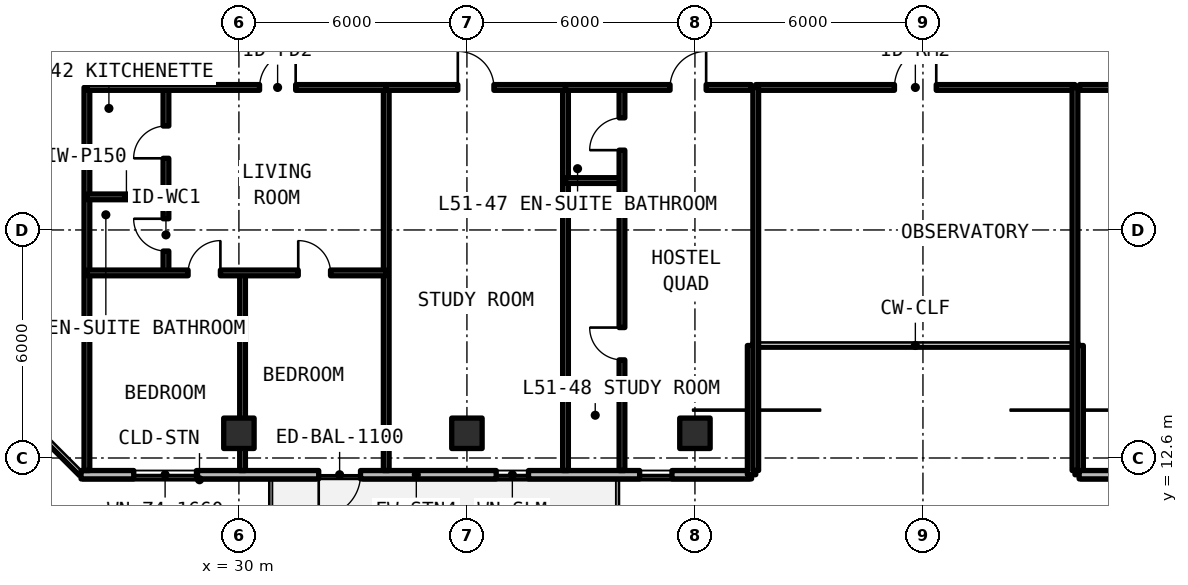
"""IFC4 building model, lengths in metres.
Left out: names, types, materials, properties, quantities, classifications, styles, units other than length and angle.
Written with IfcOpenShell. Run it as: python <this file> out.ifc"""

import sys

from ifc_helpers import new_model, si_unit, direction, frame, frame_2d, origin, origin_2d, place, context, subcontext, project, spatial, rectangle, extrude, element, fill, save


model = new_model("IFC4")
c1 = context("Model", 3, precision=1e-05, world=origin(), true_north=direction((0.0, 1.0)))
c2 = subcontext(c1, "Body", "Model", "MODEL_VIEW")
j1 = project(units=[si_unit("LENGTHUNIT", "METRE"), si_unit("PLANEANGLEUNIT", "RADIAN")], contexts=[c1])
p1 = place(None, origin())
s1 = spatial("IfcSite", under=j1, at=p1, CompositionType="ELEMENT")
p2 = place(p1, origin())
s2 = spatial("IfcBuilding", under=s1, at=p2, CompositionType="ELEMENT")
p3 = place(p2, frame((0.0, 0.0, 185.13)))
s3 = spatial("IfcBuildingStorey", under=s2, at=p3, CompositionType="ELEMENT", Elevation=185.13)
for number, where, z_axis, x_axis in (
    (1, (30.0, 13.25, 0.0), (0.0, 0.0, 1.0), (1.0, 0.0, 0.0)),
    (2, (36.0, 13.25, 0.0), (0.0, 0.0, 1.0), (1.0, 0.0, 0.0)),
    (3, (42.0, 13.25, 0.0), (0.0, 0.0, 1.0), (1.0, 0.0, 0.0)),
):
    element("IfcColumn", number, at=place(p3, frame(where, z_axis=z_axis, x_axis=x_axis)), inside=s3, PredefinedType="COLUMN", context=c2, shape_type="SweptSolid", body=[
        extrude(rectangle(XDim=0.8, YDim=0.8, at=origin_2d()), origin(), (0.0, 0.0, 1.0), 3.3),
    ])
p4 = place(p3, frame((25.846, 12.16, 0.0), z_axis=(0.0, 0.0, 1.0), x_axis=(1.0, 0.0, 0.0)))
e4 = element("IfcWall", 4, at=p4, inside=s3, PredefinedType="SOLIDWALL", context=c2, shape_type="SweptSolid", body=[
    extrude(rectangle(XDim=17.644, YDim=0.22, at=frame_2d((8.822, 0.0))), origin(), (0.0, 0.0, 1.0), 3.08),
])
p5 = place(p4, frame((6.254, 0.0, 0.0)))
e5 = element("IfcOpeningElement", 5, at=p5, cuts=e4, PredefinedType="OPENING", context=c2, shape_type="SweptSolid", body=[
    extrude(rectangle(XDim=1.1, YDim=2.15, at=frame_2d((0.55, 1.075))), frame((0.0, 0.12, 0.0), z_axis=(0.0, -1.0, 0.0), x_axis=(1.0, 0.0, 0.0)), (0.0, 0.0, 1.0), 0.24),
])
p6 = place(p4, frame((1.387, 0.0, 0.78)))
e6 = element("IfcOpeningElement", 6, at=p6, cuts=e4, PredefinedType="OPENING", context=c2, shape_type="SweptSolid", body=[
    extrude(rectangle(XDim=1.65, YDim=1.66, at=frame_2d((0.825, 0.83))), frame((0.0, 0.12, 0.0), z_axis=(0.0, -1.0, 0.0), x_axis=(1.0, 0.0, 0.0)), (0.0, 0.0, 1.0), 0.24),
])
p7 = place(p4, frame((10.925, 0.0, 0.78)))
e7 = element("IfcOpeningElement", 7, at=p7, cuts=e4, PredefinedType="OPENING", context=c2, shape_type="SweptSolid", body=[
    extrude(rectangle(XDim=0.85, YDim=1.65, at=frame_2d((0.425, 0.825))), frame((0.0, 0.12, 0.0), z_axis=(0.0, -1.0, 0.0), x_axis=(1.0, 0.0, 0.0)), (0.0, 0.0, 1.0), 0.24),
])
p8 = place(p4, frame((14.699, 0.0, 0.78)))
e8 = element("IfcOpeningElement", 8, at=p8, cuts=e4, PredefinedType="OPENING", context=c2, shape_type="SweptSolid", body=[
    extrude(rectangle(XDim=0.85, YDim=1.65, at=frame_2d((0.425, 0.825))), frame((0.0, 0.12, 0.0), z_axis=(0.0, -1.0, 0.0), x_axis=(1.0, 0.0, 0.0)), (0.0, 0.0, 1.0), 0.24),
])
for number, where, z_axis, x_axis in (
    (9, (43.49, 12.16, 0.0), (0.0, 0.0, 1.0), (0.0, 1.0, 0.0)),
    (10, (52.11, 15.56, 0.0), (0.0, 0.0, 1.0), (0.0, -1.0, 0.0)),
):
    element("IfcWall", number, at=place(p3, frame(where, z_axis=z_axis, x_axis=x_axis)), inside=s3, PredefinedType="SOLIDWALL", context=c2, shape_type="SweptSolid", body=[
        extrude(rectangle(XDim=3.4, YDim=0.22, at=frame_2d((1.7, 0.0))), origin(), (0.0, 0.0, 1.0), 3.08),
    ])
p9 = place(p3, frame((52.11, 12.16, 0.0), z_axis=(0.0, 0.0, 1.0), x_axis=(1.0, 0.0, 0.0)))
e11 = element("IfcWall", 11, at=p9, inside=s3, PredefinedType="SOLIDWALL", context=c2, shape_type="SweptSolid", body=[
    extrude(rectangle(XDim=43.244, YDim=0.22, at=frame_2d((21.622, 0.0))), origin(), (0.0, 0.0, 1.0), 3.08),
])
p10 = place(p9, frame((4.19, 0.0, 0.0)))
e12 = element("IfcOpeningElement", 12, at=p10, cuts=e11, PredefinedType="OPENING", context=c2, shape_type="SweptSolid", body=[
    extrude(rectangle(XDim=1.1, YDim=2.15, at=frame_2d((0.55, 1.075))), frame((0.0, 0.12, 0.0), z_axis=(0.0, -1.0, 0.0), x_axis=(1.0, 0.0, 0.0)), (0.0, 0.0, 1.0), 0.24),
])
p11 = place(p9, frame((17.54, 0.0, 0.0)))
e13 = element("IfcOpeningElement", 13, at=p11, cuts=e11, PredefinedType="OPENING", context=c2, shape_type="SweptSolid", body=[
    extrude(rectangle(XDim=1.1, YDim=2.15, at=frame_2d((0.55, 1.075))), frame((0.0, 0.12, 0.0), z_axis=(0.0, -1.0, 0.0), x_axis=(1.0, 0.0, 0.0)), (0.0, 0.0, 1.0), 0.24),
])
p12 = place(p9, frame((28.89, 0.0, 0.0)))
e14 = element("IfcOpeningElement", 14, at=p12, cuts=e11, PredefinedType="OPENING", context=c2, shape_type="SweptSolid", body=[
    extrude(rectangle(XDim=1.1, YDim=2.15, at=frame_2d((0.55, 1.075))), frame((0.0, 0.12, 0.0), z_axis=(0.0, -1.0, 0.0), x_axis=(1.0, 0.0, 0.0)), (0.0, 0.0, 1.0), 0.24),
])
p13 = place(p9, frame((8.66, 0.0, 0.78)))
e15 = element("IfcOpeningElement", 15, at=p13, cuts=e11, PredefinedType="OPENING", context=c2, shape_type="SweptSolid", body=[
    extrude(rectangle(XDim=1.65, YDim=1.66, at=frame_2d((0.825, 0.83))), frame((0.0, 0.12, 0.0), z_axis=(0.0, -1.0, 0.0), x_axis=(1.0, 0.0, 0.0)), (0.0, 0.0, 1.0), 0.24),
])
p14 = place(p9, frame((14.759, 0.0, 0.78)))
e16 = element("IfcOpeningElement", 16, at=p14, cuts=e11, PredefinedType="OPENING", context=c2, shape_type="SweptSolid", body=[
    extrude(rectangle(XDim=1.65, YDim=1.66, at=frame_2d((0.825, 0.83))), frame((0.0, 0.12, 0.0), z_axis=(0.0, -1.0, 0.0), x_axis=(1.0, 0.0, 0.0)), (0.0, 0.0, 1.0), 0.24),
])
p15 = place(p9, frame((32.902, 0.0, 0.78)))
e17 = element("IfcOpeningElement", 17, at=p15, cuts=e11, PredefinedType="OPENING", context=c2, shape_type="SweptSolid", body=[
    extrude(rectangle(XDim=1.65, YDim=1.66, at=frame_2d((0.825, 0.83))), frame((0.0, 0.12, 0.0), z_axis=(0.0, -1.0, 0.0), x_axis=(1.0, 0.0, 0.0)), (0.0, 0.0, 1.0), 0.24),
])
p16 = place(p9, frame((38.313, 0.0, 0.78)))
e18 = element("IfcOpeningElement", 18, at=p16, cuts=e11, PredefinedType="OPENING", context=c2, shape_type="SweptSolid", body=[
    extrude(rectangle(XDim=0.85, YDim=1.65, at=frame_2d((0.425, 0.825))), frame((0.0, 0.12, 0.0), z_axis=(0.0, -1.0, 0.0), x_axis=(1.0, 0.0, 0.0)), (0.0, 0.0, 1.0), 0.24),
])
p17 = place(p9, frame((40.615, 0.0, 0.78)))
e19 = element("IfcOpeningElement", 19, at=p17, cuts=e11, PredefinedType="OPENING", context=c2, shape_type="SweptSolid", body=[
    extrude(rectangle(XDim=1.65, YDim=1.66, at=frame_2d((0.825, 0.83))), frame((0.0, 0.12, 0.0), z_axis=(0.0, -1.0, 0.0), x_axis=(1.0, 0.0, 0.0)), (0.0, 0.0, 1.0), 0.24),
])
p18 = place(p3, frame((43.6, 22.35, 0.0), z_axis=(0.0, 0.0, 1.0), x_axis=(1.0, 0.0, 0.0)))
e20 = element("IfcWall", 20, at=p18, inside=s3, PredefinedType="SOLIDWALL", context=c2, shape_type="SweptSolid", body=[
    extrude(rectangle(XDim=8.4, YDim=0.15, at=frame_2d((4.2, 0.0))), origin(), (0.0, 0.0, 1.0), 2.35),
])
p19 = place(p18, frame((3.65, 0.0, 0.0)))
e21 = element("IfcOpeningElement", 21, at=p19, cuts=e20, PredefinedType="OPENING", context=c2, shape_type="SweptSolid", body=[
    extrude(rectangle(XDim=1.1, YDim=2.15, at=frame_2d((0.55, 1.075))), frame((0.0, 0.085, 0.0), z_axis=(0.0, -1.0, 0.0), x_axis=(1.0, 0.0, 0.0)), (0.0, 0.0, 1.0), 0.17),
])
for number, where, z_axis, x_axis in (
    (22, (43.6, 12.27, 0.0), (0.0, 0.0, 1.0), (0.0, 1.0, 0.0)),
    (23, (52.0, 12.27, 0.0), (0.0, 0.0, 1.0), (0.0, 1.0, 0.0)),
    (24, (26.0, 12.27, 0.0), (0.0, 0.0, 1.0), (0.0, 1.0, 0.0)),
    (25, (33.876, 12.27, 0.0), (0.0, 0.0, 1.0), (0.0, 1.0, 0.0)),
):
    element("IfcWall", number, at=place(p3, frame(where, z_axis=z_axis, x_axis=x_axis)), inside=s3, PredefinedType="SOLIDWALL", context=c2, shape_type="SweptSolid", body=[
        extrude(rectangle(XDim=10.08, YDim=0.15, at=frame_2d((5.04, 0.0))), origin(), (0.0, 0.0, 1.0), 2.35),
    ])
p20 = place(p3, frame((26.0, 19.471, 0.0), z_axis=(0.0, 0.0, 1.0), x_axis=(1.0, 0.0, 0.0)))
e26 = element("IfcWall", 26, at=p20, inside=s3, PredefinedType="PARTITIONING", context=c2, shape_type="SweptSolid", body=[
    extrude(rectangle(XDim=2.08, YDim=0.15, at=frame_2d((1.04, 0.0))), origin(), (0.0, 0.0, 1.0), 2.35),
])
p21 = place(p3, frame((28.08, 17.47, 0.0), z_axis=(0.0, 0.0, 1.0), x_axis=(0.0, 1.0, 0.0)))
e27 = element("IfcWall", 27, at=p21, inside=s3, PredefinedType="PARTITIONING", context=c2, shape_type="SweptSolid", body=[
    extrude(rectangle(XDim=4.88, YDim=0.15, at=frame_2d((2.44, 0.0))), origin(), (0.0, 0.0, 1.0), 2.35),
])
p22 = place(p21, frame((0.575, 0.0, 0.0)))
e28 = element("IfcOpeningElement", 28, at=p22, cuts=e27, PredefinedType="OPENING", context=c2, shape_type="SweptSolid", body=[
    extrude(rectangle(XDim=0.85, YDim=2.1, at=frame_2d((0.425, 1.05))), frame((0.0, 0.085, 0.0), z_axis=(0.0, -1.0, 0.0), x_axis=(1.0, 0.0, 0.0)), (0.0, 0.0, 1.0), 0.17),
])
p23 = place(p21, frame((3.015, 0.0, 0.0)))
e29 = element("IfcOpeningElement", 29, at=p23, cuts=e27, PredefinedType="OPENING", context=c2, shape_type="SweptSolid", body=[
    extrude(rectangle(XDim=0.85, YDim=2.1, at=frame_2d((0.425, 1.05))), frame((0.0, 0.085, 0.0), z_axis=(0.0, -1.0, 0.0), x_axis=(1.0, 0.0, 0.0)), (0.0, 0.0, 1.0), 0.17),
])
p24 = place(p3, frame((30.096, 12.27, 0.0), z_axis=(0.0, 0.0, 1.0), x_axis=(0.0, 1.0, 0.0)))
e30 = element("IfcWall", 30, at=p24, inside=s3, PredefinedType="PARTITIONING", context=c2, shape_type="SweptSolid", body=[
    extrude(rectangle(XDim=5.2, YDim=0.15, at=frame_2d((2.6, 0.0))), origin(), (0.0, 0.0, 1.0), 2.35),
])
p25 = place(p3, frame((26.0, 17.47, 0.0), z_axis=(0.0, 0.0, 1.0), x_axis=(1.0, 0.0, 0.0)))
e31 = element("IfcWall", 31, at=p25, inside=s3, PredefinedType="PARTITIONING", context=c2, shape_type="SweptSolid", body=[
    extrude(rectangle(XDim=7.876, YDim=0.15, at=frame_2d((3.938, 0.0))), origin(), (0.0, 0.0, 1.0), 2.35),
])
p26 = place(p25, frame((2.663, 0.0, 0.0)))
e32 = element("IfcOpeningElement", 32, at=p26, cuts=e31, PredefinedType="OPENING", context=c2, shape_type="SweptSolid", body=[
    extrude(rectangle(XDim=0.85, YDim=2.1, at=frame_2d((0.425, 1.05))), frame((0.0, 0.085, 0.0), z_axis=(0.0, -1.0, 0.0), x_axis=(1.0, 0.0, 0.0)), (0.0, 0.0, 1.0), 0.17),
])
p27 = place(p25, frame((5.561, 0.0, 0.0)))
e33 = element("IfcOpeningElement", 33, at=p27, cuts=e31, PredefinedType="OPENING", context=c2, shape_type="SweptSolid", body=[
    extrude(rectangle(XDim=0.85, YDim=2.1, at=frame_2d((0.425, 1.05))), frame((0.0, 0.085, 0.0), z_axis=(0.0, -1.0, 0.0), x_axis=(1.0, 0.0, 0.0)), (0.0, 0.0, 1.0), 0.17),
])
p28 = place(p3, frame((26.0, 22.35, 0.0), z_axis=(0.0, 0.0, 1.0), x_axis=(1.0, 0.0, 0.0)))
e34 = element("IfcWall", 34, at=p28, inside=s3, PredefinedType="SOLIDWALL", context=c2, shape_type="SweptSolid", body=[
    extrude(rectangle(XDim=7.876, YDim=0.15, at=frame_2d((3.938, 0.0))), origin(), (0.0, 0.0, 1.0), 2.35),
])
p29 = place(p28, frame((4.543, 0.0, 0.0)))
e35 = element("IfcOpeningElement", 35, at=p29, cuts=e34, PredefinedType="OPENING", context=c2, shape_type="SweptSolid", body=[
    extrude(rectangle(XDim=0.95, YDim=2.15, at=frame_2d((0.475, 1.075))), frame((0.0, 0.085, 0.0), z_axis=(0.0, -1.0, 0.0), x_axis=(1.0, 0.0, 0.0)), (0.0, 0.0, 1.0), 0.17),
])
p30 = place(p3, frame((38.594, 12.27, 0.0), z_axis=(0.0, 0.0, 1.0), x_axis=(0.0, 1.0, 0.0)))
e36 = element("IfcWall", 36, at=p30, inside=s3, PredefinedType="SOLIDWALL", context=c2, shape_type="SweptSolid", body=[
    extrude(rectangle(XDim=10.08, YDim=0.15, at=frame_2d((5.04, 0.0))), origin(), (0.0, 0.0, 1.0), 2.35),
])
p31 = place(p3, frame((33.876, 22.35, 0.0), z_axis=(0.0, 0.0, 1.0), x_axis=(1.0, 0.0, 0.0)))
e37 = element("IfcWall", 37, at=p31, inside=s3, PredefinedType="SOLIDWALL", context=c2, shape_type="SweptSolid", body=[
    extrude(rectangle(XDim=4.718, YDim=0.15, at=frame_2d((2.359, 0.0))), origin(), (0.0, 0.0, 1.0), 2.35),
])
p32 = place(p31, frame((1.884, 0.0, 0.0)))
e38 = element("IfcOpeningElement", 38, at=p32, cuts=e37, PredefinedType="OPENING", context=c2, shape_type="SweptSolid", body=[
    extrude(rectangle(XDim=0.95, YDim=2.15, at=frame_2d((0.475, 1.075))), frame((0.0, 0.085, 0.0), z_axis=(0.0, -1.0, 0.0), x_axis=(1.0, 0.0, 0.0)), (0.0, 0.0, 1.0), 0.17),
])
p33 = place(p3, frame((38.594, 19.9, 0.0), z_axis=(0.0, 0.0, 1.0), x_axis=(1.0, 0.0, 0.0)))
e39 = element("IfcWall", 39, at=p33, inside=s3, PredefinedType="PARTITIONING", context=c2, shape_type="SweptSolid", body=[
    extrude(rectangle(XDim=1.486, YDim=0.15, at=frame_2d((0.743, 0.0))), origin(), (0.0, 0.0, 1.0), 2.35),
])
p34 = place(p3, frame((40.08, 12.27, 0.0), z_axis=(0.0, 0.0, 1.0), x_axis=(0.0, 1.0, 0.0)))
e40 = element("IfcWall", 40, at=p34, inside=s3, PredefinedType="PARTITIONING", context=c2, shape_type="SweptSolid", body=[
    extrude(rectangle(XDim=10.08, YDim=0.15, at=frame_2d((5.04, 0.0))), origin(), (0.0, 0.0, 1.0), 2.35),
])
p35 = place(p34, frame((2.912, 0.0, 0.0)))
e41 = element("IfcOpeningElement", 41, at=p35, cuts=e40, PredefinedType="OPENING", context=c2, shape_type="SweptSolid", body=[
    extrude(rectangle(XDim=0.85, YDim=2.1, at=frame_2d((0.425, 1.05))), frame((0.0, 0.085, 0.0), z_axis=(0.0, -1.0, 0.0), x_axis=(1.0, 0.0, 0.0)), (0.0, 0.0, 1.0), 0.17),
])
p36 = place(p34, frame((8.43, 0.0, 0.0)))
e42 = element("IfcOpeningElement", 42, at=p36, cuts=e40, PredefinedType="OPENING", context=c2, shape_type="SweptSolid", body=[
    extrude(rectangle(XDim=0.85, YDim=2.1, at=frame_2d((0.425, 1.05))), frame((0.0, 0.085, 0.0), z_axis=(0.0, -1.0, 0.0), x_axis=(1.0, 0.0, 0.0)), (0.0, 0.0, 1.0), 0.17),
])
p37 = place(p3, frame((38.594, 22.35, 0.0), z_axis=(0.0, 0.0, 1.0), x_axis=(1.0, 0.0, 0.0)))
e43 = element("IfcWall", 43, at=p37, inside=s3, PredefinedType="SOLIDWALL", context=c2, shape_type="SweptSolid", body=[
    extrude(rectangle(XDim=4.886, YDim=0.15, at=frame_2d((2.443, 0.0))), origin(), (0.0, 0.0, 1.0), 2.35),
])
p38 = place(p37, frame((2.751, 0.0, 0.0)))
e44 = element("IfcOpeningElement", 44, at=p38, cuts=e43, PredefinedType="OPENING", context=c2, shape_type="SweptSolid", body=[
    extrude(rectangle(XDim=0.95, YDim=2.15, at=frame_2d((0.475, 1.075))), frame((0.0, 0.085, 0.0), z_axis=(0.0, -1.0, 0.0), x_axis=(1.0, 0.0, 0.0)), (0.0, 0.0, 1.0), 0.17),
])
p39 = place(p3, frame((52.12, 22.35, 0.0), z_axis=(0.0, 0.0, 1.0), x_axis=(1.0, 0.0, 0.0)))
e45 = element("IfcWall", 45, at=p39, inside=s3, PredefinedType="SOLIDWALL", context=c2, shape_type="SweptSolid", body=[
    extrude(rectangle(XDim=5.976, YDim=0.15, at=frame_2d((2.988, 0.0))), origin(), (0.0, 0.0, 1.0), 2.35),
])
p40 = place(p39, frame((2.513, 0.0, 0.0)))
e46 = element("IfcOpeningElement", 46, at=p40, cuts=e45, PredefinedType="OPENING", context=c2, shape_type="SweptSolid", body=[
    extrude(rectangle(XDim=0.95, YDim=2.15, at=frame_2d((0.475, 1.075))), frame((0.0, 0.085, 0.0), z_axis=(0.0, -1.0, 0.0), x_axis=(1.0, 0.0, 0.0)), (0.0, 0.0, 1.0), 0.17),
])
p41 = place(p5, frame((1.1, 0.0, 0.0), z_axis=(0.0, 0.0, 1.0), x_axis=(-1.0, 0.0, 0.0)))
e47 = element("IfcDoor", 47, at=p41, inside=s3, OperationType="SINGLE_SWING_LEFT", PredefinedType="DOOR", context=c2, shape_type="SweptSolid", body=[
    extrude(rectangle(XDim=1.1, YDim=2.15, at=frame_2d((0.55, 1.075))), frame((0.0, 0.025, 0.0), z_axis=(0.0, -1.0, 0.0), x_axis=(1.0, 0.0, 0.0)), (0.0, 0.0, 1.0), 0.05),
])
fill(e5, e47)
p42 = place(p6, origin())
e48 = element("IfcWindow", 48, at=p42, inside=s3, PartitioningType="SINGLE_PANEL", PredefinedType="WINDOW", context=c2, shape_type="SweptSolid", body=[
    extrude(rectangle(XDim=1.65, YDim=1.66, at=frame_2d((0.825, 0.83))), frame((0.0, 0.03, 0.0), z_axis=(0.0, -1.0, 0.0), x_axis=(1.0, 0.0, 0.0)), (0.0, 0.0, 1.0), 0.06),
])
fill(e6, e48)
p43 = place(p7, origin())
e49 = element("IfcWindow", 49, at=p43, inside=s3, PartitioningType="SINGLE_PANEL", PredefinedType="WINDOW", context=c2, shape_type="SweptSolid", body=[
    extrude(rectangle(XDim=0.85, YDim=1.65, at=frame_2d((0.425, 0.825))), frame((0.0, 0.03, 0.0), z_axis=(0.0, -1.0, 0.0), x_axis=(1.0, 0.0, 0.0)), (0.0, 0.0, 1.0), 0.06),
])
fill(e7, e49)
p44 = place(p8, origin())
e50 = element("IfcWindow", 50, at=p44, inside=s3, PartitioningType="SINGLE_PANEL", PredefinedType="WINDOW", context=c2, shape_type="SweptSolid", body=[
    extrude(rectangle(XDim=0.85, YDim=1.65, at=frame_2d((0.425, 0.825))), frame((0.0, 0.03, 0.0), z_axis=(0.0, -1.0, 0.0), x_axis=(1.0, 0.0, 0.0)), (0.0, 0.0, 1.0), 0.06),
])
fill(e8, e50)
p45 = place(p19, origin())
e51 = element("IfcDoor", 51, at=p45, inside=s3, OperationType="SINGLE_SWING_RIGHT", PredefinedType="DOOR", context=c2, shape_type="SweptSolid", body=[
    extrude(rectangle(XDim=1.1, YDim=2.15, at=frame_2d((0.55, 1.075))), frame((0.0, 0.025, 0.0), z_axis=(0.0, -1.0, 0.0), x_axis=(1.0, 0.0, 0.0)), (0.0, 0.0, 1.0), 0.05),
])
fill(e21, e51)
p46 = place(p22, origin())
e52 = element("IfcDoor", 52, at=p46, inside=s3, OperationType="SINGLE_SWING_RIGHT", PredefinedType="DOOR", context=c2, shape_type="SweptSolid", body=[
    extrude(rectangle(XDim=0.85, YDim=2.1, at=frame_2d((0.425, 1.05))), frame((0.0, 0.025, 0.0), z_axis=(0.0, -1.0, 0.0), x_axis=(1.0, 0.0, 0.0)), (0.0, 0.0, 1.0), 0.05),
])
fill(e28, e52)
p47 = place(p23, origin())
e53 = element("IfcDoor", 53, at=p47, inside=s3, OperationType="SINGLE_SWING_LEFT", PredefinedType="DOOR", context=c2, shape_type="SweptSolid", body=[
    extrude(rectangle(XDim=0.85, YDim=2.1, at=frame_2d((0.425, 1.05))), frame((0.0, 0.025, 0.0), z_axis=(0.0, -1.0, 0.0), x_axis=(1.0, 0.0, 0.0)), (0.0, 0.0, 1.0), 0.05),
])
fill(e29, e53)
p48 = place(p26, origin())
e54 = element("IfcDoor", 54, at=p48, inside=s3, OperationType="SINGLE_SWING_RIGHT", PredefinedType="DOOR", context=c2, shape_type="SweptSolid", body=[
    extrude(rectangle(XDim=0.85, YDim=2.1, at=frame_2d((0.425, 1.05))), frame((0.0, 0.025, 0.0), z_axis=(0.0, -1.0, 0.0), x_axis=(1.0, 0.0, 0.0)), (0.0, 0.0, 1.0), 0.05),
])
fill(e32, e54)
p49 = place(p27, origin())
e55 = element("IfcDoor", 55, at=p49, inside=s3, OperationType="SINGLE_SWING_LEFT", PredefinedType="DOOR", context=c2, shape_type="SweptSolid", body=[
    extrude(rectangle(XDim=0.85, YDim=2.1, at=frame_2d((0.425, 1.05))), frame((0.0, 0.025, 0.0), z_axis=(0.0, -1.0, 0.0), x_axis=(1.0, 0.0, 0.0)), (0.0, 0.0, 1.0), 0.05),
])
fill(e33, e55)
p50 = place(p29, origin())
e56 = element("IfcDoor", 56, at=p50, inside=s3, OperationType="SINGLE_SWING_RIGHT", PredefinedType="DOOR", context=c2, shape_type="SweptSolid", body=[
    extrude(rectangle(XDim=0.95, YDim=2.15, at=frame_2d((0.475, 1.075))), frame((0.0, 0.025, 0.0), z_axis=(0.0, -1.0, 0.0), x_axis=(1.0, 0.0, 0.0)), (0.0, 0.0, 1.0), 0.05),
])
fill(e35, e56)
p51 = place(p32, origin())
e57 = element("IfcDoor", 57, at=p51, inside=s3, OperationType="SINGLE_SWING_LEFT", PredefinedType="DOOR", context=c2, shape_type="SweptSolid", body=[
    extrude(rectangle(XDim=0.95, YDim=2.15, at=frame_2d((0.475, 1.075))), frame((0.0, 0.025, 0.0), z_axis=(0.0, -1.0, 0.0), x_axis=(1.0, 0.0, 0.0)), (0.0, 0.0, 1.0), 0.05),
])
fill(e38, e57)
p52 = place(p35, origin())
e58 = element("IfcDoor", 58, at=p52, inside=s3, OperationType="SINGLE_SWING_RIGHT", PredefinedType="DOOR", context=c2, shape_type="SweptSolid", body=[
    extrude(rectangle(XDim=0.85, YDim=2.1, at=frame_2d((0.425, 1.05))), frame((0.0, 0.025, 0.0), z_axis=(0.0, -1.0, 0.0), x_axis=(1.0, 0.0, 0.0)), (0.0, 0.0, 1.0), 0.05),
])
fill(e41, e58)
p53 = place(p36, origin())
e59 = element("IfcDoor", 59, at=p53, inside=s3, OperationType="SINGLE_SWING_LEFT", PredefinedType="DOOR", context=c2, shape_type="SweptSolid", body=[
    extrude(rectangle(XDim=0.85, YDim=2.1, at=frame_2d((0.425, 1.05))), frame((0.0, 0.025, 0.0), z_axis=(0.0, -1.0, 0.0), x_axis=(1.0, 0.0, 0.0)), (0.0, 0.0, 1.0), 0.05),
])
fill(e42, e59)
p54 = place(p38, origin())
e60 = element("IfcDoor", 60, at=p54, inside=s3, OperationType="SINGLE_SWING_RIGHT", PredefinedType="DOOR", context=c2, shape_type="SweptSolid", body=[
    extrude(rectangle(XDim=0.95, YDim=2.15, at=frame_2d((0.475, 1.075))), frame((0.0, 0.025, 0.0), z_axis=(0.0, -1.0, 0.0), x_axis=(1.0, 0.0, 0.0)), (0.0, 0.0, 1.0), 0.05),
])
fill(e44, e60)
save(model, sys.argv[1])
